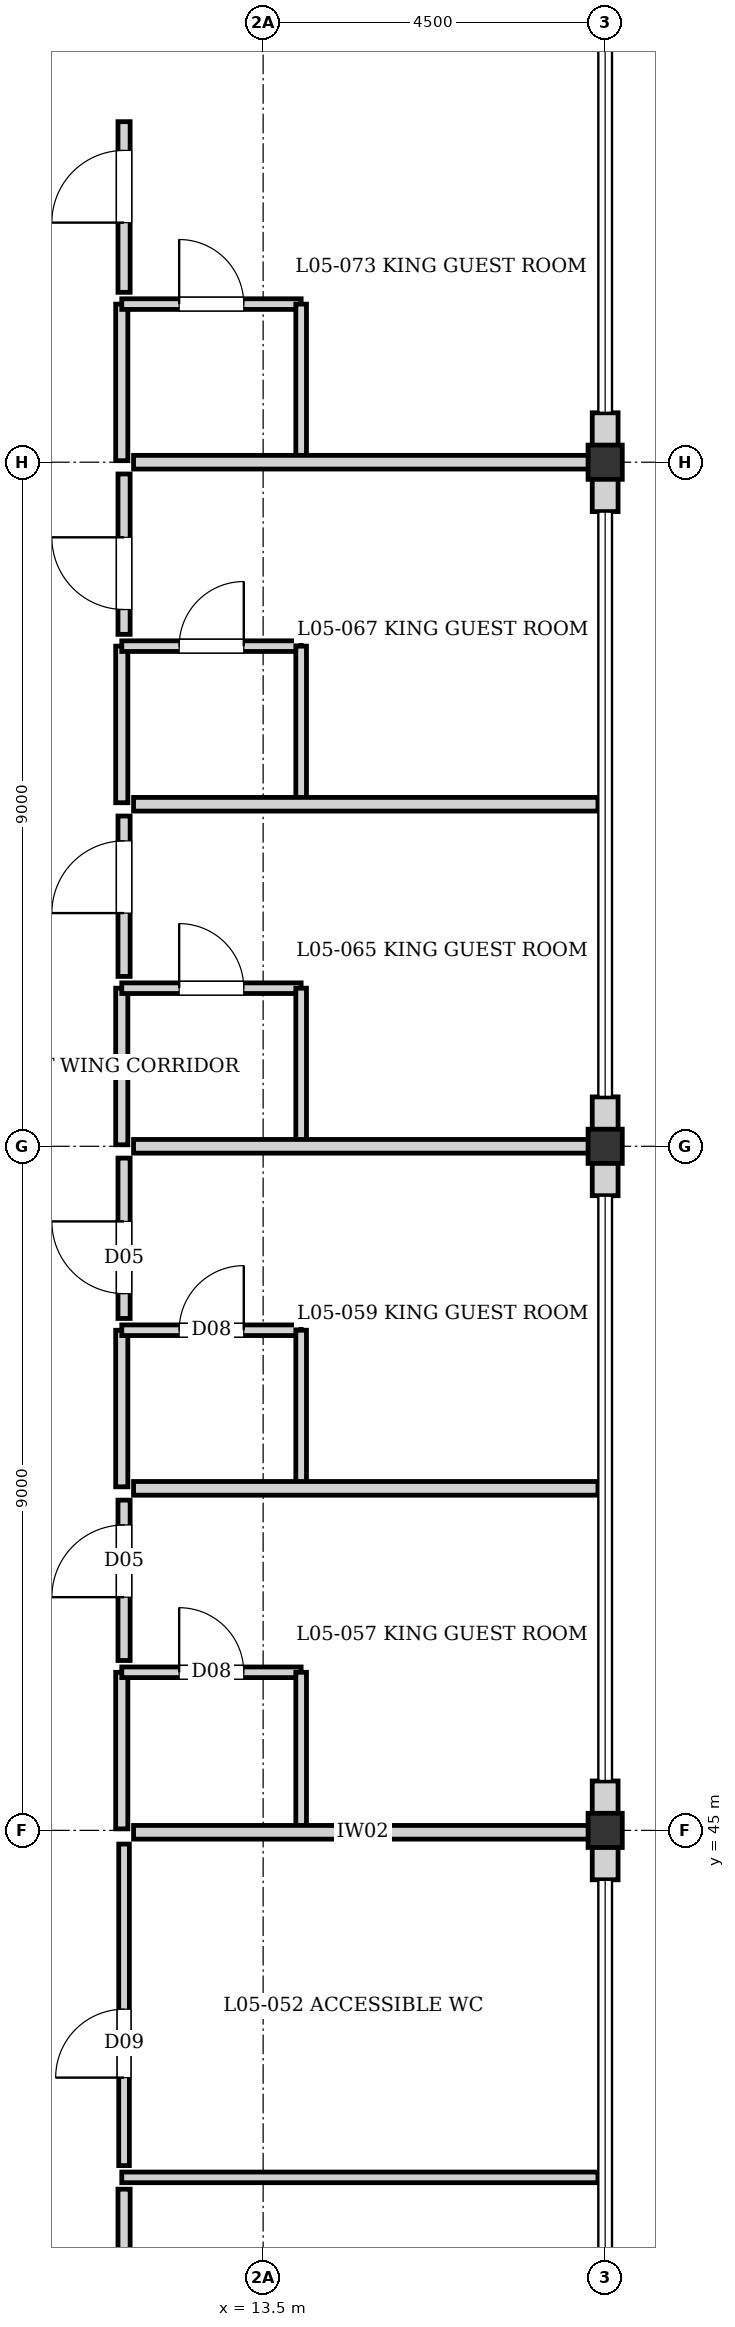
"""IFC4 building model, lengths in metres.
Left out: names, types, materials, properties, quantities, classifications, styles, units other than length and angle.
Written with IfcOpenShell. Run it as: python <this file> out.ifc"""

import sys

from ifc_helpers import new_model, si_unit, direction, frame, frame_2d, origin, origin_2d, place, context, subcontext, project, spatial, rectangle, extrude, element, fill, save


model = new_model("IFC4")
c1 = context("Model", 3, precision=1e-05, world=origin(), true_north=direction((0.0, 1.0)))
c2 = subcontext(c1, "Body", "Model", "MODEL_VIEW")
j1 = project(units=[si_unit("LENGTHUNIT", "METRE"), si_unit("PLANEANGLEUNIT", "RADIAN")], contexts=[c1])
p1 = place(None, origin())
s1 = spatial("IfcSite", under=j1, at=p1, CompositionType="ELEMENT")
p2 = place(p1, origin())
s2 = spatial("IfcBuilding", under=s1, at=p2, CompositionType="ELEMENT")
p3 = place(p2, frame((0.0, 0.0, 17.6)))
s3 = spatial("IfcBuildingStorey", under=s2, at=p3, CompositionType="ELEMENT", Elevation=17.6)
for number, where, z_axis, x_axis in (
    (1, (18.0, 45.0, 0.0), (0.0, 0.0, 1.0), (1.0, 0.0, 0.0)),
    (2, (18.0, 54.0, 0.0), (0.0, 0.0, 1.0), (1.0, 0.0, 0.0)),
    (3, (18.0, 63.0, 0.0), (0.0, 0.0, 1.0), (1.0, 0.0, 0.0)),
):
    element("IfcColumn", number, at=place(p3, frame(where, z_axis=z_axis, x_axis=x_axis)), inside=s3, PredefinedType="COLUMN", context=c2, shape_type="SweptSolid", body=[
        extrude(rectangle(XDim=0.45, YDim=0.45, at=origin_2d()), origin(), (0.0, 0.0, 1.0), 3.04),
    ])
p4 = place(p3, frame((18.0, 63.65, 0.0), z_axis=(0.0, 0.0, 1.0), x_axis=(0.0, -1.0, 0.0)))
e4 = element("IfcWall", 4, at=p4, inside=s3, PredefinedType="SOLIDWALL", context=c2, shape_type="SweptSolid", body=[
    extrude(rectangle(XDim=0.65, YDim=0.34, at=frame_2d((0.325, 0.0))), origin(), (0.0, 0.0, 1.0), 2.38),
])
for number, where, z_axis, x_axis in (
    (5, (18.0, 63.0, 0.0), (0.0, 0.0, 1.0), (0.0, -1.0, 0.0)),
    (6, (18.0, 54.65, 0.0), (0.0, 0.0, 1.0), (0.0, -1.0, 0.0)),
):
    element("IfcWall", number, at=place(p3, frame(where, z_axis=z_axis, x_axis=x_axis)), inside=s3, PredefinedType="SOLIDWALL", context=c2, shape_type="SweptSolid", body=[
        extrude(rectangle(XDim=0.65, YDim=0.34, at=frame_2d((0.325, 0.0))), origin(), (0.0, 0.0, 1.0), 2.42),
    ])
for number, where, z_axis, x_axis in (
    (7, (18.0, 54.0, 0.0), (0.0, 0.0, 1.0), (0.0, -1.0, 0.0)),
    (8, (18.0, 45.65, 0.0), (0.0, 0.0, 1.0), (0.0, -1.0, 0.0)),
):
    element("IfcWall", number, at=place(p3, frame(where, z_axis=z_axis, x_axis=x_axis)), inside=s3, PredefinedType="SOLIDWALL", context=c2, shape_type="SweptSolid", body=[
        extrude(rectangle(XDim=0.65, YDim=0.34, at=frame_2d((0.325, 0.0))), origin(), (0.0, 0.0, 1.0), 2.48),
    ])
p5 = place(p3, frame((18.0, 45.0, 0.0), z_axis=(0.0, 0.0, 1.0), x_axis=(0.0, -1.0, 0.0)))
e9 = element("IfcWall", 9, at=p5, inside=s3, PredefinedType="SOLIDWALL", context=c2, shape_type="SweptSolid", body=[
    extrude(rectangle(XDim=0.65, YDim=0.34, at=frame_2d((0.325, 0.0))), origin(), (0.0, 0.0, 1.0), 2.82),
])
p6 = place(p3, frame((11.64, 45.02, 0.0), z_axis=(0.0, 0.0, 1.0), x_axis=(0.0, 1.0, 0.0)))
e10 = element("IfcWall", 10, at=p6, inside=s3, PredefinedType="PARTITIONING", context=c2, shape_type="SweptSolid", body=[
    extrude(rectangle(XDim=2.06, YDim=0.16, at=frame_2d((1.03, 0.0))), origin(), (0.0, 0.0, 1.0), 2.82),
])
p7 = place(p3, frame((11.64, 47.08, 0.0), z_axis=(0.0, 0.0, 1.0), x_axis=(1.0, 0.0, 0.0)))
e11 = element("IfcWall", 11, at=p7, inside=s3, PredefinedType="PLUMBINGWALL", context=c2, shape_type="SweptSolid", body=[
    extrude(rectangle(XDim=2.36, YDim=0.14, at=frame_2d((1.18, 0.0))), origin(), (0.0, 0.0, 1.0), 2.82),
])
p8 = place(p7, frame((0.755, 0.0, 0.0)))
e12 = element("IfcOpeningElement", 12, at=p8, cuts=e11, PredefinedType="OPENING", context=c2, shape_type="SweptSolid", body=[
    extrude(rectangle(XDim=0.85, YDim=2.04, at=frame_2d((0.425, 1.02))), frame((0.0, 0.08, 0.0), z_axis=(0.0, -1.0, 0.0), x_axis=(1.0, 0.0, 0.0)), (0.0, 0.0, 1.0), 0.16),
])
p9 = place(p3, frame((14.0, 45.02, 0.0), z_axis=(0.0, 0.0, 1.0), x_axis=(0.0, 1.0, 0.0)))
e13 = element("IfcWall", 13, at=p9, inside=s3, PredefinedType="PLUMBINGWALL", context=c2, shape_type="SweptSolid", body=[
    extrude(rectangle(XDim=2.06, YDim=0.14, at=frame_2d((1.03, 0.0))), origin(), (0.0, 0.0, 1.0), 2.82),
])
p10 = place(p3, frame((11.64, 49.52, 0.0), z_axis=(0.0, 0.0, 1.0), x_axis=(0.0, 1.0, 0.0)))
e14 = element("IfcWall", 14, at=p10, inside=s3, PredefinedType="PARTITIONING", context=c2, shape_type="SweptSolid", body=[
    extrude(rectangle(XDim=2.06, YDim=0.16, at=frame_2d((1.03, 0.0))), origin(), (0.0, 0.0, 1.0), 2.82),
])
p11 = place(p3, frame((11.64, 51.58, 0.0), z_axis=(0.0, 0.0, 1.0), x_axis=(1.0, 0.0, 0.0)))
e15 = element("IfcWall", 15, at=p11, inside=s3, PredefinedType="PLUMBINGWALL", context=c2, shape_type="SweptSolid", body=[
    extrude(rectangle(XDim=2.36, YDim=0.14, at=frame_2d((1.18, 0.0))), origin(), (0.0, 0.0, 1.0), 2.82),
])
p12 = place(p11, frame((0.755, 0.0, 0.0)))
e16 = element("IfcOpeningElement", 16, at=p12, cuts=e15, PredefinedType="OPENING", context=c2, shape_type="SweptSolid", body=[
    extrude(rectangle(XDim=0.85, YDim=2.04, at=frame_2d((0.425, 1.02))), frame((0.0, 0.08, 0.0), z_axis=(0.0, -1.0, 0.0), x_axis=(1.0, 0.0, 0.0)), (0.0, 0.0, 1.0), 0.16),
])
p13 = place(p3, frame((14.0, 49.52, 0.0), z_axis=(0.0, 0.0, 1.0), x_axis=(0.0, 1.0, 0.0)))
e17 = element("IfcWall", 17, at=p13, inside=s3, PredefinedType="PLUMBINGWALL", context=c2, shape_type="SweptSolid", body=[
    extrude(rectangle(XDim=2.06, YDim=0.14, at=frame_2d((1.03, 0.0))), origin(), (0.0, 0.0, 1.0), 2.82),
])
p14 = place(p3, frame((11.64, 54.02, 0.0), z_axis=(0.0, 0.0, 1.0), x_axis=(0.0, 1.0, 0.0)))
e18 = element("IfcWall", 18, at=p14, inside=s3, PredefinedType="PARTITIONING", context=c2, shape_type="SweptSolid", body=[
    extrude(rectangle(XDim=2.06, YDim=0.16, at=frame_2d((1.03, 0.0))), origin(), (0.0, 0.0, 1.0), 2.82),
])
p15 = place(p3, frame((11.64, 56.08, 0.0), z_axis=(0.0, 0.0, 1.0), x_axis=(1.0, 0.0, 0.0)))
e19 = element("IfcWall", 19, at=p15, inside=s3, PredefinedType="PLUMBINGWALL", context=c2, shape_type="SweptSolid", body=[
    extrude(rectangle(XDim=2.36, YDim=0.14, at=frame_2d((1.18, 0.0))), origin(), (0.0, 0.0, 1.0), 2.82),
])
p16 = place(p15, frame((0.755, 0.0, 0.0)))
e20 = element("IfcOpeningElement", 20, at=p16, cuts=e19, PredefinedType="OPENING", context=c2, shape_type="SweptSolid", body=[
    extrude(rectangle(XDim=0.85, YDim=2.04, at=frame_2d((0.425, 1.02))), frame((0.0, 0.08, 0.0), z_axis=(0.0, -1.0, 0.0), x_axis=(1.0, 0.0, 0.0)), (0.0, 0.0, 1.0), 0.16),
])
p17 = place(p3, frame((14.0, 54.02, 0.0), z_axis=(0.0, 0.0, 1.0), x_axis=(0.0, 1.0, 0.0)))
e21 = element("IfcWall", 21, at=p17, inside=s3, PredefinedType="PLUMBINGWALL", context=c2, shape_type="SweptSolid", body=[
    extrude(rectangle(XDim=2.06, YDim=0.14, at=frame_2d((1.03, 0.0))), origin(), (0.0, 0.0, 1.0), 2.82),
])
p18 = place(p3, frame((11.64, 58.52, 0.0), z_axis=(0.0, 0.0, 1.0), x_axis=(0.0, 1.0, 0.0)))
e22 = element("IfcWall", 22, at=p18, inside=s3, PredefinedType="PARTITIONING", context=c2, shape_type="SweptSolid", body=[
    extrude(rectangle(XDim=2.06, YDim=0.16, at=frame_2d((1.03, 0.0))), origin(), (0.0, 0.0, 1.0), 2.82),
])
p19 = place(p3, frame((11.64, 60.58, 0.0), z_axis=(0.0, 0.0, 1.0), x_axis=(1.0, 0.0, 0.0)))
e23 = element("IfcWall", 23, at=p19, inside=s3, PredefinedType="PLUMBINGWALL", context=c2, shape_type="SweptSolid", body=[
    extrude(rectangle(XDim=2.36, YDim=0.14, at=frame_2d((1.18, 0.0))), origin(), (0.0, 0.0, 1.0), 2.82),
])
p20 = place(p19, frame((0.755, 0.0, 0.0)))
e24 = element("IfcOpeningElement", 24, at=p20, cuts=e23, PredefinedType="OPENING", context=c2, shape_type="SweptSolid", body=[
    extrude(rectangle(XDim=0.85, YDim=2.04, at=frame_2d((0.425, 1.02))), frame((0.0, 0.08, 0.0), z_axis=(0.0, -1.0, 0.0), x_axis=(1.0, 0.0, 0.0)), (0.0, 0.0, 1.0), 0.16),
])
p21 = place(p3, frame((14.0, 58.52, 0.0), z_axis=(0.0, 0.0, 1.0), x_axis=(0.0, 1.0, 0.0)))
e25 = element("IfcWall", 25, at=p21, inside=s3, PredefinedType="PLUMBINGWALL", context=c2, shape_type="SweptSolid", body=[
    extrude(rectangle(XDim=2.06, YDim=0.14, at=frame_2d((1.03, 0.0))), origin(), (0.0, 0.0, 1.0), 2.82),
])
p22 = place(p3, frame((11.64, 63.02, 0.0), z_axis=(0.0, 0.0, 1.0), x_axis=(0.0, 1.0, 0.0)))
e26 = element("IfcWall", 26, at=p22, inside=s3, PredefinedType="PARTITIONING", context=c2, shape_type="SweptSolid", body=[
    extrude(rectangle(XDim=2.06, YDim=0.16, at=frame_2d((1.03, 0.0))), origin(), (0.0, 0.0, 1.0), 2.82),
])
p23 = place(p3, frame((11.64, 65.08, 0.0), z_axis=(0.0, 0.0, 1.0), x_axis=(1.0, 0.0, 0.0)))
e27 = element("IfcWall", 27, at=p23, inside=s3, PredefinedType="PLUMBINGWALL", context=c2, shape_type="SweptSolid", body=[
    extrude(rectangle(XDim=2.36, YDim=0.14, at=frame_2d((1.18, 0.0))), origin(), (0.0, 0.0, 1.0), 2.82),
])
p24 = place(p23, frame((0.755, 0.0, 0.0)))
e28 = element("IfcOpeningElement", 28, at=p24, cuts=e27, PredefinedType="OPENING", context=c2, shape_type="SweptSolid", body=[
    extrude(rectangle(XDim=0.85, YDim=2.04, at=frame_2d((0.425, 1.02))), frame((0.0, 0.08, 0.0), z_axis=(0.0, -1.0, 0.0), x_axis=(1.0, 0.0, 0.0)), (0.0, 0.0, 1.0), 0.16),
])
p25 = place(p3, frame((14.0, 63.02, 0.0), z_axis=(0.0, 0.0, 1.0), x_axis=(0.0, 1.0, 0.0)))
e29 = element("IfcWall", 29, at=p25, inside=s3, PredefinedType="PLUMBINGWALL", context=c2, shape_type="SweptSolid", body=[
    extrude(rectangle(XDim=2.06, YDim=0.14, at=frame_2d((1.03, 0.0))), origin(), (0.0, 0.0, 1.0), 2.82),
])
p26 = place(p3, frame((11.795, 44.975, 0.0), z_axis=(0.0, 0.0, 1.0), x_axis=(1.0, 0.0, 0.0)))
e30 = element("IfcWall", 30, at=p26, inside=s3, PredefinedType="PARTITIONING", context=c2, shape_type="SweptSolid", body=[
    extrude(rectangle(XDim=6.03, YDim=0.18, at=frame_2d((3.015, 0.0))), origin(), (0.0, 0.0, 1.0), 2.55),
])
p27 = place(p3, frame((11.795, 49.5, 0.0), z_axis=(0.0, 0.0, 1.0), x_axis=(1.0, 0.0, 0.0)))
e31 = element("IfcWall", 31, at=p27, inside=s3, PredefinedType="PARTITIONING", context=c2, shape_type="SweptSolid", body=[
    extrude(rectangle(XDim=6.11, YDim=0.18, at=frame_2d((3.055, 0.0))), origin(), (0.0, 0.0, 1.0), 2.82),
])
p28 = place(p3, frame((11.795, 54.0, 0.0), z_axis=(0.0, 0.0, 1.0), x_axis=(1.0, 0.0, 0.0)))
e32 = element("IfcWall", 32, at=p28, inside=s3, PredefinedType="PARTITIONING", context=c2, shape_type="SweptSolid", body=[
    extrude(rectangle(XDim=6.03, YDim=0.18, at=frame_2d((3.015, 0.0))), origin(), (0.0, 0.0, 1.0), 2.33),
])
p29 = place(p3, frame((11.795, 58.5, 0.0), z_axis=(0.0, 0.0, 1.0), x_axis=(1.0, 0.0, 0.0)))
e33 = element("IfcWall", 33, at=p29, inside=s3, PredefinedType="PARTITIONING", context=c2, shape_type="SweptSolid", body=[
    extrude(rectangle(XDim=6.11, YDim=0.18, at=frame_2d((3.055, 0.0))), origin(), (0.0, 0.0, 1.0), 2.82),
])
p30 = place(p3, frame((11.795, 63.0, 0.0), z_axis=(0.0, 0.0, 1.0), x_axis=(1.0, 0.0, 0.0)))
e34 = element("IfcWall", 34, at=p30, inside=s3, PredefinedType="PARTITIONING", context=c2, shape_type="SweptSolid", body=[
    extrude(rectangle(XDim=6.03, YDim=0.18, at=frame_2d((3.015, 0.0))), origin(), (0.0, 0.0, 1.0), 2.55),
])
p31 = place(p3, frame((11.64, 40.435, 0.0), z_axis=(0.0, 0.0, 1.0), x_axis=(1.0, 0.0, 0.0)))
e35 = element("IfcWall", 35, at=p31, inside=s3, PredefinedType="PLUMBINGWALL", context=c2, shape_type="SweptSolid", body=[
    extrude(rectangle(XDim=6.265, YDim=0.14, at=frame_2d((3.133, 0.0))), origin(), (0.0, 0.0, 1.0), 2.82),
])
p32 = place(p3, frame((11.67, 36.155, 0.0), z_axis=(0.0, 0.0, 1.0), x_axis=(0.0, 1.0, 0.0)))
e36 = element("IfcWall", 36, at=p32, inside=s3, PredefinedType="PARTITIONING", context=c2, shape_type="SweptSolid", body=[
    extrude(rectangle(XDim=4.125, YDim=0.16, at=frame_2d((2.062, 0.0))), origin(), (0.0, 0.0, 1.0), 2.82),
])
p33 = place(p32, frame((2.058, 0.0, 0.0)))
e37 = element("IfcOpeningElement", 37, at=p33, cuts=e36, PredefinedType="OPENING", context=c2, shape_type="SweptSolid", body=[
    extrude(rectangle(XDim=1.0, YDim=2.1, at=frame_2d((0.5, 1.05))), frame((0.0, 0.09, 0.0), z_axis=(0.0, -1.0, 0.0), x_axis=(1.0, 0.0, 0.0)), (0.0, 0.0, 1.0), 0.18),
])
p34 = place(p3, frame((11.67, 40.59, 0.0), z_axis=(0.0, 0.0, 1.0), x_axis=(0.0, 1.0, 0.0)))
e38 = element("IfcWall", 38, at=p34, inside=s3, PredefinedType="PLUMBINGWALL", context=c2, shape_type="SweptSolid", body=[
    extrude(rectangle(XDim=4.23, YDim=0.14, at=frame_2d((2.115, 0.0))), origin(), (0.0, 0.0, 1.0), 2.82),
])
p35 = place(p34, frame((1.157, 0.0, 0.0)))
e39 = element("IfcOpeningElement", 39, at=p35, cuts=e38, PredefinedType="OPENING", context=c2, shape_type="SweptSolid", body=[
    extrude(rectangle(XDim=0.9, YDim=2.1, at=frame_2d((0.45, 1.05))), frame((0.0, 0.08, 0.0), z_axis=(0.0, -1.0, 0.0), x_axis=(1.0, 0.0, 0.0)), (0.0, 0.0, 1.0), 0.16),
])
p36 = place(p3, frame((11.67, 47.235, 0.0), z_axis=(0.0, 0.0, 1.0), x_axis=(0.0, 1.0, 0.0)))
e40 = element("IfcWall", 40, at=p36, inside=s3, PredefinedType="PARTITIONING", context=c2, shape_type="SweptSolid", body=[
    extrude(rectangle(XDim=2.11, YDim=0.16, at=frame_2d((1.055, 0.0))), origin(), (0.0, 0.0, 1.0), 2.82),
])
p37 = place(p36, frame((0.833, 0.0, 0.0)))
e41 = element("IfcOpeningElement", 41, at=p37, cuts=e40, PredefinedType="OPENING", context=c2, shape_type="SweptSolid", body=[
    extrude(rectangle(XDim=0.95, YDim=2.15, at=frame_2d((0.475, 1.075))), frame((0.0, 0.09, 0.0), z_axis=(0.0, -1.0, 0.0), x_axis=(1.0, 0.0, 0.0)), (0.0, 0.0, 1.0), 0.18),
])
p38 = place(p3, frame((11.67, 51.735, 0.0), z_axis=(0.0, 0.0, 1.0), x_axis=(0.0, 1.0, 0.0)))
e42 = element("IfcWall", 42, at=p38, inside=s3, PredefinedType="PARTITIONING", context=c2, shape_type="SweptSolid", body=[
    extrude(rectangle(XDim=2.11, YDim=0.16, at=frame_2d((1.055, 0.0))), origin(), (0.0, 0.0, 1.0), 2.82),
])
p39 = place(p38, frame((0.327, 0.0, 0.0)))
e43 = element("IfcOpeningElement", 43, at=p39, cuts=e42, PredefinedType="OPENING", context=c2, shape_type="SweptSolid", body=[
    extrude(rectangle(XDim=0.95, YDim=2.15, at=frame_2d((0.475, 1.075))), frame((0.0, 0.09, 0.0), z_axis=(0.0, -1.0, 0.0), x_axis=(1.0, 0.0, 0.0)), (0.0, 0.0, 1.0), 0.18),
])
p40 = place(p3, frame((11.67, 56.235, 0.0), z_axis=(0.0, 0.0, 1.0), x_axis=(0.0, 1.0, 0.0)))
e44 = element("IfcWall", 44, at=p40, inside=s3, PredefinedType="PARTITIONING", context=c2, shape_type="SweptSolid", body=[
    extrude(rectangle(XDim=2.11, YDim=0.16, at=frame_2d((1.055, 0.0))), origin(), (0.0, 0.0, 1.0), 2.82),
])
p41 = place(p40, frame((0.833, 0.0, 0.0)))
e45 = element("IfcOpeningElement", 45, at=p41, cuts=e44, PredefinedType="OPENING", context=c2, shape_type="SweptSolid", body=[
    extrude(rectangle(XDim=0.95, YDim=2.15, at=frame_2d((0.475, 1.075))), frame((0.0, 0.09, 0.0), z_axis=(0.0, -1.0, 0.0), x_axis=(1.0, 0.0, 0.0)), (0.0, 0.0, 1.0), 0.18),
])
p42 = place(p3, frame((11.67, 60.735, 0.0), z_axis=(0.0, 0.0, 1.0), x_axis=(0.0, 1.0, 0.0)))
e46 = element("IfcWall", 46, at=p42, inside=s3, PredefinedType="PARTITIONING", context=c2, shape_type="SweptSolid", body=[
    extrude(rectangle(XDim=2.11, YDim=0.16, at=frame_2d((1.055, 0.0))), origin(), (0.0, 0.0, 1.0), 2.82),
])
p43 = place(p42, frame((0.327, 0.0, 0.0)))
e47 = element("IfcOpeningElement", 47, at=p43, cuts=e46, PredefinedType="OPENING", context=c2, shape_type="SweptSolid", body=[
    extrude(rectangle(XDim=0.95, YDim=2.15, at=frame_2d((0.475, 1.075))), frame((0.0, 0.09, 0.0), z_axis=(0.0, -1.0, 0.0), x_axis=(1.0, 0.0, 0.0)), (0.0, 0.0, 1.0), 0.18),
])
p44 = place(p3, frame((11.67, 65.235, 0.0), z_axis=(0.0, 0.0, 1.0), x_axis=(0.0, 1.0, 0.0)))
e48 = element("IfcWall", 48, at=p44, inside=s3, PredefinedType="PARTITIONING", context=c2, shape_type="SweptSolid", body=[
    extrude(rectangle(XDim=2.245, YDim=0.16, at=frame_2d((1.123, 0.0))), origin(), (0.0, 0.0, 1.0), 2.82),
])
p45 = place(p44, frame((0.917, 0.0, 0.0)))
e49 = element("IfcOpeningElement", 49, at=p45, cuts=e48, PredefinedType="OPENING", context=c2, shape_type="SweptSolid", body=[
    extrude(rectangle(XDim=0.95, YDim=2.15, at=frame_2d((0.475, 1.075))), frame((0.0, 0.09, 0.0), z_axis=(0.0, -1.0, 0.0), x_axis=(1.0, 0.0, 0.0)), (0.0, 0.0, 1.0), 0.18),
])
p46 = place(p8, origin())
e50 = element("IfcDoor", 50, at=p46, inside=s3, OperationType="SINGLE_SWING_LEFT", PredefinedType="DOOR", context=c2, shape_type="SweptSolid", body=[
    extrude(rectangle(XDim=0.85, YDim=2.04, at=frame_2d((0.425, 1.02))), frame((0.0, 0.025, 0.0), z_axis=(0.0, -1.0, 0.0), x_axis=(1.0, 0.0, 0.0)), (0.0, 0.0, 1.0), 0.05),
])
fill(e12, e50)
p47 = place(p12, origin())
e51 = element("IfcDoor", 51, at=p47, inside=s3, OperationType="SINGLE_SWING_RIGHT", PredefinedType="DOOR", context=c2, shape_type="SweptSolid", body=[
    extrude(rectangle(XDim=0.85, YDim=2.04, at=frame_2d((0.425, 1.02))), frame((0.0, 0.025, 0.0), z_axis=(0.0, -1.0, 0.0), x_axis=(1.0, 0.0, 0.0)), (0.0, 0.0, 1.0), 0.05),
])
fill(e16, e51)
p48 = place(p16, origin())
e52 = element("IfcDoor", 52, at=p48, inside=s3, OperationType="SINGLE_SWING_LEFT", PredefinedType="DOOR", context=c2, shape_type="SweptSolid", body=[
    extrude(rectangle(XDim=0.85, YDim=2.04, at=frame_2d((0.425, 1.02))), frame((0.0, 0.025, 0.0), z_axis=(0.0, -1.0, 0.0), x_axis=(1.0, 0.0, 0.0)), (0.0, 0.0, 1.0), 0.05),
])
fill(e20, e52)
p49 = place(p20, origin())
e53 = element("IfcDoor", 53, at=p49, inside=s3, OperationType="SINGLE_SWING_RIGHT", PredefinedType="DOOR", context=c2, shape_type="SweptSolid", body=[
    extrude(rectangle(XDim=0.85, YDim=2.04, at=frame_2d((0.425, 1.02))), frame((0.0, 0.025, 0.0), z_axis=(0.0, -1.0, 0.0), x_axis=(1.0, 0.0, 0.0)), (0.0, 0.0, 1.0), 0.05),
])
fill(e24, e53)
p50 = place(p24, origin())
e54 = element("IfcDoor", 54, at=p50, inside=s3, OperationType="SINGLE_SWING_LEFT", PredefinedType="DOOR", context=c2, shape_type="SweptSolid", body=[
    extrude(rectangle(XDim=0.85, YDim=2.04, at=frame_2d((0.425, 1.02))), frame((0.0, 0.025, 0.0), z_axis=(0.0, -1.0, 0.0), x_axis=(1.0, 0.0, 0.0)), (0.0, 0.0, 1.0), 0.05),
])
fill(e28, e54)
p51 = place(p35, origin())
e55 = element("IfcDoor", 55, at=p51, inside=s3, OperationType="SINGLE_SWING_LEFT", PredefinedType="DOOR", context=c2, shape_type="SweptSolid", body=[
    extrude(rectangle(XDim=0.9, YDim=2.1, at=frame_2d((0.45, 1.05))), frame((0.0, 0.025, 0.0), z_axis=(0.0, -1.0, 0.0), x_axis=(1.0, 0.0, 0.0)), (0.0, 0.0, 1.0), 0.05),
])
fill(e39, e55)
p52 = place(p37, origin())
e56 = element("IfcDoor", 56, at=p52, inside=s3, OperationType="SINGLE_SWING_LEFT", PredefinedType="DOOR", context=c2, shape_type="SweptSolid", body=[
    extrude(rectangle(XDim=0.95, YDim=2.15, at=frame_2d((0.475, 1.075))), frame((0.0, 0.025, 0.0), z_axis=(0.0, -1.0, 0.0), x_axis=(1.0, 0.0, 0.0)), (0.0, 0.0, 1.0), 0.05),
])
fill(e41, e56)
p53 = place(p39, origin())
e57 = element("IfcDoor", 57, at=p53, inside=s3, OperationType="SINGLE_SWING_RIGHT", PredefinedType="DOOR", context=c2, shape_type="SweptSolid", body=[
    extrude(rectangle(XDim=0.95, YDim=2.15, at=frame_2d((0.475, 1.075))), frame((0.0, 0.025, 0.0), z_axis=(0.0, -1.0, 0.0), x_axis=(1.0, 0.0, 0.0)), (0.0, 0.0, 1.0), 0.05),
])
fill(e43, e57)
p54 = place(p41, origin())
e58 = element("IfcDoor", 58, at=p54, inside=s3, OperationType="SINGLE_SWING_LEFT", PredefinedType="DOOR", context=c2, shape_type="SweptSolid", body=[
    extrude(rectangle(XDim=0.95, YDim=2.15, at=frame_2d((0.475, 1.075))), frame((0.0, 0.025, 0.0), z_axis=(0.0, -1.0, 0.0), x_axis=(1.0, 0.0, 0.0)), (0.0, 0.0, 1.0), 0.05),
])
fill(e45, e58)
p55 = place(p43, origin())
e59 = element("IfcDoor", 59, at=p55, inside=s3, OperationType="SINGLE_SWING_RIGHT", PredefinedType="DOOR", context=c2, shape_type="SweptSolid", body=[
    extrude(rectangle(XDim=0.95, YDim=2.15, at=frame_2d((0.475, 1.075))), frame((0.0, 0.025, 0.0), z_axis=(0.0, -1.0, 0.0), x_axis=(1.0, 0.0, 0.0)), (0.0, 0.0, 1.0), 0.05),
])
fill(e47, e59)
p56 = place(p45, origin())
e60 = element("IfcDoor", 60, at=p56, inside=s3, OperationType="SINGLE_SWING_LEFT", PredefinedType="DOOR", context=c2, shape_type="SweptSolid", body=[
    extrude(rectangle(XDim=0.95, YDim=2.15, at=frame_2d((0.475, 1.075))), frame((0.0, 0.025, 0.0), z_axis=(0.0, -1.0, 0.0), x_axis=(1.0, 0.0, 0.0)), (0.0, 0.0, 1.0), 0.05),
])
fill(e49, e60)
save(model, sys.argv[1])
